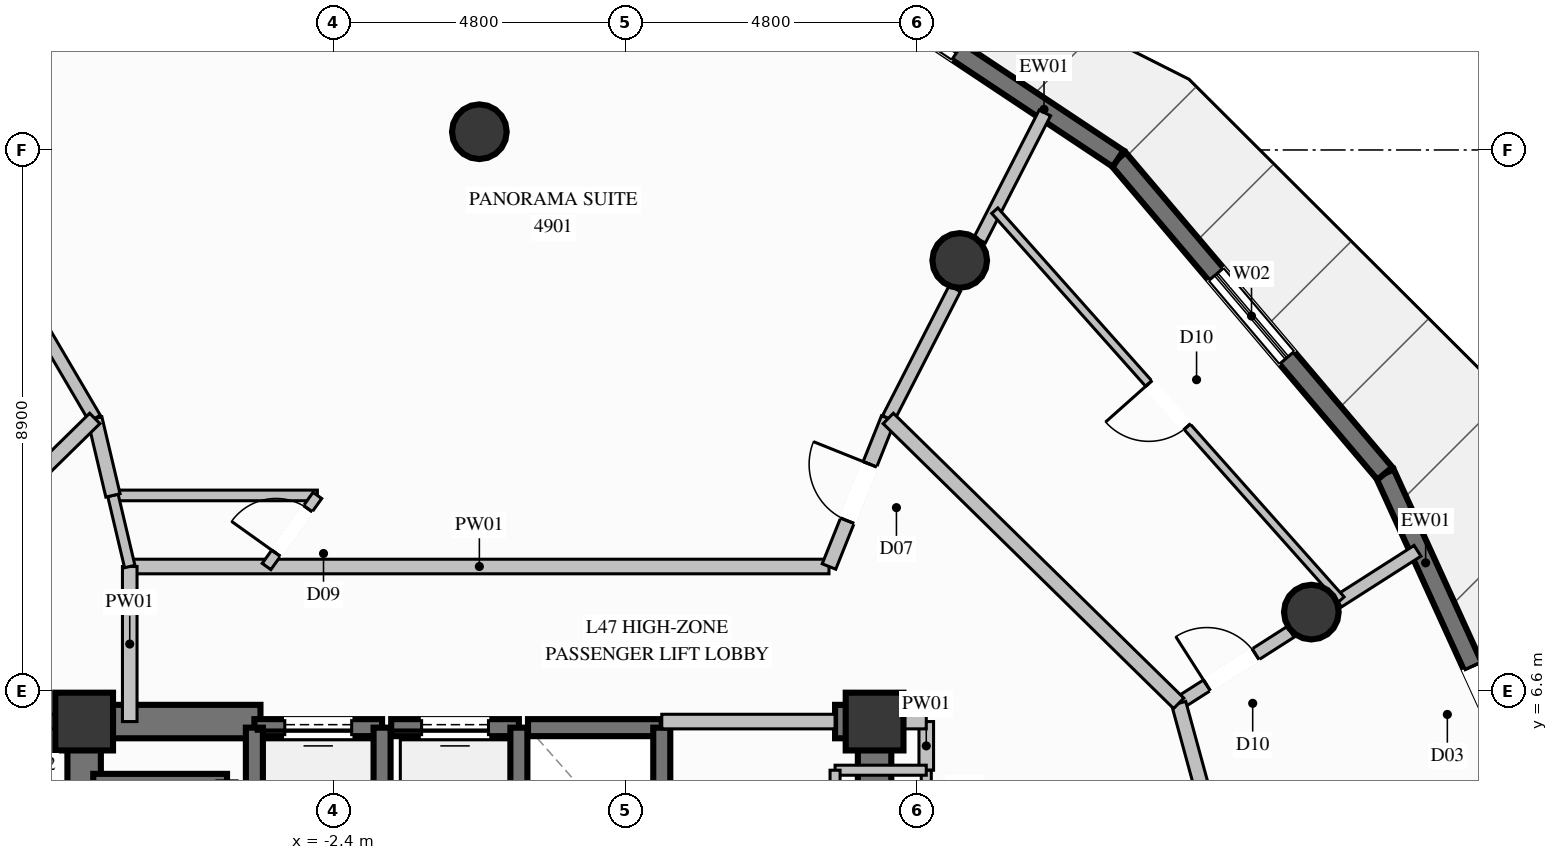
"""IFC4 building model, lengths in metres.
Left out: names, types, materials, properties, quantities, classifications, styles, units other than length and angle.
Written with IfcOpenShell. Run it as: python <this file> out.ifc"""

import sys

from ifc_helpers import new_model, si_unit, direction, frame, frame_2d, origin, origin_2d, place, context, subcontext, project, spatial, rectangle, circle, extrude, element, fill, save


model = new_model("IFC4")
c1 = context("Model", 3, precision=1e-05, world=origin(), true_north=direction((0.0, 1.0)))
c2 = subcontext(c1, "Body", "Model", "MODEL_VIEW")
j1 = project(units=[si_unit("LENGTHUNIT", "METRE"), si_unit("PLANEANGLEUNIT", "RADIAN")], contexts=[c1])
p1 = place(None, origin())
s1 = spatial("IfcSite", under=j1, at=p1, CompositionType="ELEMENT")
p2 = place(p1, origin())
s2 = spatial("IfcBuilding", under=s1, at=p2, CompositionType="ELEMENT")
p3 = place(p2, frame((0.0, 0.0, 184.0)))
s3 = spatial("IfcBuildingStorey", under=s2, at=p3, CompositionType="ELEMENT", Elevation=184.0)
for number, where, z_axis, x_axis in (
    (1, (6.5, 6.1, 0.0), (0.0, 0.0, 1.0), (1.0, 0.0, 0.0)),
    (2, (-6.5, 6.1, 0.0), (0.0, 0.0, 1.0), (1.0, 0.0, 0.0)),
):
    element("IfcColumn", number, at=place(p3, frame(where, z_axis=z_axis, x_axis=x_axis)), inside=s3, PredefinedType="COLUMN", context=c2, shape_type="SweptSolid", body=[
        extrude(rectangle(XDim=0.95, YDim=0.95, at=origin_2d()), origin(), (0.0, 0.0, 1.0), 3.6),
    ])
p4 = place(p3, frame((-6.225, 6.1, 0.0), z_axis=(0.0, 0.0, 1.0), x_axis=(1.0, 0.0, 0.0)))
e3 = element("IfcWall", 3, at=p4, inside=s3, PredefinedType="SHEAR", context=c2, shape_type="SweptSolid", body=[
    extrude(rectangle(XDim=2.625, YDim=0.55, at=frame_2d((1.312, 0.0))), origin(), (0.0, 0.0, 1.0), 3.6),
])
p5 = place(p3, frame((5.85, 6.1, 0.0), z_axis=(0.0, 0.0, 1.0), x_axis=(1.0, 0.0, 0.0)))
e4 = element("IfcWall", 4, at=p5, inside=s3, PredefinedType="SHEAR", context=c2, shape_type="SweptSolid", body=[
    extrude(rectangle(XDim=0.375, YDim=0.55, at=frame_2d((0.188, 0.0))), origin(), (0.0, 0.0, 1.0), 3.6),
])
p6 = place(p3, frame((-6.5, 2.35, 0.0), z_axis=(0.0, 0.0, 1.0), x_axis=(0.0, 1.0, 0.0)))
e5 = element("IfcWall", 5, at=p6, inside=s3, PredefinedType="SHEAR", context=c2, shape_type="SweptSolid", body=[
    extrude(rectangle(XDim=4.025, YDim=0.55, at=frame_2d((2.012, 0.0))), origin(), (0.0, 0.0, 1.0), 3.6),
])
p7 = place(p3, frame((6.5, 3.35, 0.0), z_axis=(0.0, 0.0, 1.0), x_axis=(0.0, 1.0, 0.0)))
e6 = element("IfcWall", 6, at=p7, inside=s3, PredefinedType="SHEAR", context=c2, shape_type="SweptSolid", body=[
    extrude(rectangle(XDim=3.025, YDim=0.55, at=frame_2d((1.512, 0.0))), origin(), (0.0, 0.0, 1.0), 3.6),
])
for number, where, z_axis, x_axis in (
    (7, (13.683, 7.9, 0.0), (0.0, 0.0, 1.0), (1.0, 0.0, 0.0)),
    (8, (7.9, 13.683, 0.0), (0.0, 0.0, 1.0), (1.0, 0.0, 0.0)),
    (9, (0.0, 15.8, 0.0), (0.0, 0.0, 1.0), (1.0, 0.0, 0.0)),
):
    element("IfcColumn", number, at=place(p3, frame(where, z_axis=z_axis, x_axis=x_axis)), inside=s3, PredefinedType="COLUMN", context=c2, shape_type="SweptSolid", body=[
        extrude(circle(Radius=0.45, at=origin_2d()), origin(), (0.0, 0.0, 1.0), 3.6),
    ])
p8 = place(p3, frame((14.892, 10.181, 0.0), z_axis=(0.0, 0.0, 1.0), x_axis=(0.415033398102, -0.909806176314, 0.0)))
e10 = element("IfcWall", 10, at=p8, inside=s3, PredefinedType="SOLIDWALL", context=c2, shape_type="SweptSolid", body=[
    extrude(rectangle(XDim=6.785, YDim=0.32, at=frame_2d((3.393, 0.0))), origin(), (0.0, 0.0, 1.0), 3.36),
])
p9 = place(p8, frame((3.483, 0.0, 0.0)))
e11 = element("IfcOpeningElement", 11, at=p9, cuts=e10, PredefinedType="OPENING", context=c2, shape_type="SweptSolid", body=[
    extrude(rectangle(XDim=1.1, YDim=2.2, at=frame_2d((0.55, 1.1))), frame((0.0, 0.17, 0.0), z_axis=(0.0, -1.0, 0.0), x_axis=(1.0, 0.0, 0.0)), (0.0, 0.0, 1.0), 0.34),
])
p10 = place(p3, frame((10.506, 15.357, 0.0), z_axis=(0.0, 0.0, 1.0), x_axis=(0.646480871515, -0.762930195212, 0.0)))
e12 = element("IfcWall", 12, at=p10, inside=s3, PredefinedType="SOLIDWALL", context=c2, shape_type="SweptSolid", body=[
    extrude(rectangle(XDim=6.784, YDim=0.32, at=frame_2d((3.392, 0.0))), origin(), (0.0, 0.0, 1.0), 3.36),
])
p11 = place(p10, frame((2.492, 0.0, 0.35)))
e13 = element("IfcOpeningElement", 13, at=p11, cuts=e12, PredefinedType="OPENING", context=c2, shape_type="SweptSolid", body=[
    extrude(rectangle(XDim=1.8, YDim=2.6, at=frame_2d((0.9, 1.3))), frame((0.0, 0.17, 0.0), z_axis=(0.0, -1.0, 0.0), x_axis=(1.0, 0.0, 0.0)), (0.0, 0.0, 1.0), 0.34),
])
p12 = place(p3, frame((4.978, 19.031, 0.0), z_axis=(0.0, 0.0, 1.0), x_axis=(0.832836009007, -0.553519811842, 0.0)))
e14 = element("IfcWall", 14, at=p12, inside=s3, PredefinedType="SOLIDWALL", context=c2, shape_type="SweptSolid", body=[
    extrude(rectangle(XDim=6.638, YDim=0.32, at=frame_2d((3.319, 0.0))), origin(), (0.0, 0.0, 1.0), 3.36),
])
p13 = place(p12, frame((1.659, 0.0, 0.35)))
e15 = element("IfcOpeningElement", 15, at=p13, cuts=e14, PredefinedType="OPENING", context=c2, shape_type="SweptSolid", body=[
    extrude(rectangle(XDim=1.8, YDim=2.6, at=frame_2d((0.9, 1.3))), frame((0.0, 0.17, 0.0), z_axis=(0.0, -1.0, 0.0), x_axis=(1.0, 0.0, 0.0)), (0.0, 0.0, 1.0), 0.34),
])
p14 = place(p3, frame((-1.6, 6.0, 0.0), z_axis=(0.0, 0.0, 1.0), x_axis=(-1.0, 0.0, 0.0)))
e16 = element("IfcWall", 16, at=p14, inside=s3, PredefinedType="SOLIDWALL", context=c2, shape_type="SweptSolid", body=[
    extrude(rectangle(XDim=2.1, YDim=0.28, at=frame_2d((1.05, 0.0))), origin(), (0.0, 0.0, 1.0), 3.36),
])
p15 = place(p14, frame((0.5, 0.0, 0.0)))
e17 = element("IfcOpeningElement", 17, at=p15, cuts=e16, PredefinedType="OPENING", context=c2, shape_type="SweptSolid", body=[
    extrude(rectangle(XDim=1.1, YDim=2.2, at=frame_2d((0.55, 1.1))), frame((0.0, 0.15, 0.0), z_axis=(0.0, -1.0, 0.0), x_axis=(1.0, 0.0, 0.0)), (0.0, 0.0, 1.0), 0.3),
])
for number, where, z_axis, x_axis in (
    (18, (-3.7, 6.0, 0.0), (0.0, 0.0, 1.0), (0.0, -1.0, 0.0)),
    (19, (-1.6, 3.5, 0.0), (0.0, 0.0, 1.0), (0.0, 1.0, 0.0)),
):
    element("IfcWall", number, at=place(p3, frame(where, z_axis=z_axis, x_axis=x_axis)), inside=s3, PredefinedType="SOLIDWALL", context=c2, shape_type="SweptSolid", body=[
        extrude(rectangle(XDim=2.5, YDim=0.28, at=frame_2d((1.25, 0.0))), origin(), (0.0, 0.0, 1.0), 3.36),
    ])
p16 = place(p3, frame((0.65, 6.0, 0.0), z_axis=(0.0, 0.0, 1.0), x_axis=(-1.0, 0.0, 0.0)))
e20 = element("IfcWall", 20, at=p16, inside=s3, PredefinedType="SOLIDWALL", context=c2, shape_type="SweptSolid", body=[
    extrude(rectangle(XDim=2.1, YDim=0.28, at=frame_2d((1.05, 0.0))), origin(), (0.0, 0.0, 1.0), 3.36),
])
p17 = place(p16, frame((0.5, 0.0, 0.0)))
e21 = element("IfcOpeningElement", 21, at=p17, cuts=e20, PredefinedType="OPENING", context=c2, shape_type="SweptSolid", body=[
    extrude(rectangle(XDim=1.1, YDim=2.2, at=frame_2d((0.55, 1.1))), frame((0.0, 0.15, 0.0), z_axis=(0.0, -1.0, 0.0), x_axis=(1.0, 0.0, 0.0)), (0.0, 0.0, 1.0), 0.3),
])
p18 = place(p3, frame((0.65, 3.5, 0.0), z_axis=(0.0, 0.0, 1.0), x_axis=(0.0, 1.0, 0.0)))
e22 = element("IfcWall", 22, at=p18, inside=s3, PredefinedType="SOLIDWALL", context=c2, shape_type="SweptSolid", body=[
    extrude(rectangle(XDim=2.5, YDim=0.28, at=frame_2d((1.25, 0.0))), origin(), (0.0, 0.0, 1.0), 3.36),
])
p19 = place(p3, frame((3.0, 6.0, 0.0), z_axis=(0.0, 0.0, 1.0), x_axis=(-1.0, 0.0, 0.0)))
e23 = element("IfcWall", 23, at=p19, inside=s3, PredefinedType="SOLIDWALL", context=c2, shape_type="SweptSolid", body=[
    extrude(rectangle(XDim=2.2, YDim=0.28, at=frame_2d((1.1, 0.0))), origin(), (0.0, 0.0, 1.0), 3.36),
])
p20 = place(p3, frame((3.0, 3.5, 0.0), z_axis=(0.0, 0.0, 1.0), x_axis=(0.0, 1.0, 0.0)))
e24 = element("IfcWall", 24, at=p20, inside=s3, PredefinedType="SOLIDWALL", context=c2, shape_type="SweptSolid", body=[
    extrude(rectangle(XDim=2.5, YDim=0.28, at=frame_2d((1.25, 0.0))), origin(), (0.0, 0.0, 1.0), 3.36),
])
p21 = place(p3, frame((-4.15, 5.1, 0.0), z_axis=(0.0, 0.0, 1.0), x_axis=(-1.0, 0.0, 0.0)))
e25 = element("IfcWall", 25, at=p21, inside=s3, PredefinedType="SOLIDWALL", context=c2, shape_type="SweptSolid", body=[
    extrude(rectangle(XDim=2.2, YDim=0.28, at=frame_2d((1.1, 0.0))), origin(), (0.0, 0.0, 1.0), 3.36),
])
p22 = place(p3, frame((-5.75, 8.65, 0.0), z_axis=(0.0, 0.0, 1.0), x_axis=(1.0, 0.0, 0.0)))
e26 = element("IfcWall", 26, at=p22, inside=s3, PredefinedType="PARTITIONING", context=c2, shape_type="SweptSolid", body=[
    extrude(rectangle(XDim=11.5, YDim=0.24, at=frame_2d((5.75, 0.0))), origin(), (0.0, 0.0, 1.0), 3.36),
])
p23 = place(p3, frame((3.0, 6.1, 0.0), z_axis=(0.0, 0.0, 1.0), x_axis=(1.0, 0.0, 0.0)))
e27 = element("IfcWall", 27, at=p23, inside=s3, PredefinedType="PARTITIONING", context=c2, shape_type="SweptSolid", body=[
    extrude(rectangle(XDim=2.85, YDim=0.24, at=frame_2d((1.425, 0.0))), origin(), (0.0, 0.0, 1.0), 2.445),
])
p24 = place(p3, frame((7.35, 5.3, 0.0), z_axis=(0.0, 0.0, 1.0), x_axis=(0.0, 1.0, 0.0)))
e28 = element("IfcWall", 28, at=p24, inside=s3, PredefinedType="PARTITIONING", context=c2, shape_type="SweptSolid", body=[
    extrude(rectangle(XDim=0.8, YDim=0.24, at=frame_2d((0.4, 0.0))), origin(), (0.0, 0.0, 1.0), 2.445),
])
p25 = place(p3, frame((6.5, 6.1, 0.0), z_axis=(0.0, 0.0, 1.0), x_axis=(1.0, 0.0, 0.0)))
e29 = element("IfcWall", 29, at=p25, inside=s3, PredefinedType="PARTITIONING", context=c2, shape_type="SweptSolid", body=[
    extrude(rectangle(XDim=0.85, YDim=0.24, at=frame_2d((0.425, 0.0))), origin(), (0.0, 0.0, 1.0), 2.877),
])
p26 = place(p3, frame((-5.75, 6.1, 0.0), z_axis=(0.0, 0.0, 1.0), x_axis=(0.0, 1.0, 0.0)))
e30 = element("IfcWall", 30, at=p26, inside=s3, PredefinedType="PARTITIONING", context=c2, shape_type="SweptSolid", body=[
    extrude(rectangle(XDim=2.55, YDim=0.24, at=frame_2d((1.275, 0.0))), origin(), (0.0, 0.0, 1.0), 3.36),
])
p27 = place(p3, frame((-7.35, 6.1, 0.0), z_axis=(0.0, 0.0, 1.0), x_axis=(1.0, 0.0, 0.0)))
e31 = element("IfcWall", 31, at=p27, inside=s3, PredefinedType="PARTITIONING", context=c2, shape_type="SweptSolid", body=[
    extrude(rectangle(XDim=0.85, YDim=0.24, at=frame_2d((0.425, 0.0))), origin(), (0.0, 0.0, 1.0), 2.877),
])
p28 = place(p3, frame((7.35, 3.35, 0.0), z_axis=(0.0, 0.0, 1.0), x_axis=(0.0, 1.0, 0.0)))
e32 = element("IfcWall", 32, at=p28, inside=s3, PredefinedType="PARTITIONING", context=c2, shape_type="SweptSolid", body=[
    extrude(rectangle(XDim=1.95, YDim=0.165, at=frame_2d((0.975, 0.0))), origin(), (0.0, 0.0, 1.0), 3.36),
])
p29 = place(p28, frame((0.5, 0.0, 0.0)))
e33 = element("IfcOpeningElement", 33, at=p29, cuts=e32, PredefinedType="OPENING", context=c2, shape_type="SweptSolid", body=[
    extrude(rectangle(XDim=0.95, YDim=2.1, at=frame_2d((0.475, 1.05))), frame((0.0, 0.093, 0.0), z_axis=(0.0, -1.0, 0.0), x_axis=(1.0, 0.0, 0.0)), (0.0, 0.0, 1.0), 0.185),
])
p30 = place(p3, frame((7.35, 5.3, 0.0), z_axis=(0.0, 0.0, 1.0), x_axis=(-1.0, 0.0, 0.0)))
e34 = element("IfcWall", 34, at=p30, inside=s3, PredefinedType="PARTITIONING", context=c2, shape_type="SweptSolid", body=[
    extrude(rectangle(XDim=1.5, YDim=0.165, at=frame_2d((0.75, 0.0))), origin(), (0.0, 0.0, 1.0), 2.445),
])
p31 = place(p3, frame((5.85, 5.3, 0.0), z_axis=(0.0, 0.0, 1.0), x_axis=(0.0, -1.0, 0.0)))
e35 = element("IfcWall", 35, at=p31, inside=s3, PredefinedType="PARTITIONING", context=c2, shape_type="SweptSolid", body=[
    extrude(rectangle(XDim=1.95, YDim=0.165, at=frame_2d((0.975, 0.0))), origin(), (0.0, 0.0, 1.0), 2.445),
])
p32 = place(p3, frame((11.502, 6.4, 0.0), z_axis=(0.0, 0.0, 1.0), x_axis=(0.842739917801, 0.538320936752, 0.0)))
e36 = element("IfcWall", 36, at=p32, inside=s3, PredefinedType="PARTITIONING", context=c2, shape_type="SweptSolid", body=[
    extrude(rectangle(XDim=2.185, YDim=0.21, at=frame_2d((1.092, 0.0))), origin(), (0.0, 0.0, 1.0), 2.877),
])
p33 = place(p32, frame((0.55, 0.0, 0.0)))
e37 = element("IfcOpeningElement", 37, at=p33, cuts=e36, PredefinedType="OPENING", context=c2, shape_type="SweptSolid", body=[
    extrude(rectangle(XDim=0.95, YDim=2.1, at=frame_2d((0.475, 1.05))), frame((0.0, 0.115, 0.0), z_axis=(0.0, -1.0, 0.0), x_axis=(1.0, 0.0, 0.0)), (0.0, 0.0, 1.0), 0.23),
])
p34 = place(p3, frame((14.12, 8.072, 0.0), z_axis=(0.0, 0.0, 1.0), x_axis=(0.84277351824, 0.538268331739, 0.0)))
e38 = element("IfcWall", 38, at=p34, inside=s3, PredefinedType="PARTITIONING", context=c2, shape_type="SweptSolid", body=[
    extrude(rectangle(XDim=1.553, YDim=0.21, at=frame_2d((0.776, 0.0))), origin(), (0.0, 0.0, 1.0), 3.36),
])
p35 = place(p3, frame((6.725, 11.085, 0.0), z_axis=(0.0, 0.0, 1.0), x_axis=(0.456025303107, 0.889966810014, 0.0)))
e39 = element("IfcWall", 39, at=p35, inside=s3, PredefinedType="PARTITIONING", context=c2, shape_type="SweptSolid", body=[
    extrude(rectangle(XDim=2.399, YDim=0.21, at=frame_2d((1.199, 0.0))), origin(), (0.0, 0.0, 1.0), 2.877),
])
p36 = place(p3, frame((8.229, 14.019, 0.0), z_axis=(0.0, 0.0, 1.0), x_axis=(0.456209070118, 0.889872622538, 0.0)))
e40 = element("IfcWall", 40, at=p36, inside=s3, PredefinedType="PARTITIONING", context=c2, shape_type="SweptSolid", body=[
    extrude(rectangle(XDim=2.35, YDim=0.21, at=frame_2d((1.175, 0.0))), origin(), (0.0, 0.0, 1.0), 3.36),
])
p37 = place(p3, frame((-6.325, 11.085, 0.0), z_axis=(0.0, 0.0, 1.0), x_axis=(-0.506285052897, 0.862366189744, 0.0)))
e41 = element("IfcWall", 41, at=p37, inside=s3, PredefinedType="PARTITIONING", context=c2, shape_type="SweptSolid", body=[
    extrude(rectangle(XDim=2.57, YDim=0.21, at=frame_2d((1.285, 0.0))), origin(), (0.0, 0.0, 1.0), 2.877),
])
p38 = place(p3, frame((-6.026, 9.819, 0.0), z_axis=(0.0, 0.0, 1.0), x_axis=(1.0, 0.0, 0.0)))
e42 = element("IfcWall", 42, at=p38, inside=s3, PredefinedType="PLUMBINGWALL", context=c2, shape_type="SweptSolid", body=[
    extrude(rectangle(XDim=3.362, YDim=0.175, at=frame_2d((1.681, 0.0))), origin(), (0.0, 0.0, 1.0), 3.043),
])
p39 = place(p3, frame((-6.026, 9.819, 0.0), z_axis=(0.0, 0.0, 1.0), x_axis=(0.229650980365, -0.973273048644, 0.0)))
e43 = element("IfcWall", 43, at=p39, inside=s3, PredefinedType="PLUMBINGWALL", context=c2, shape_type="SweptSolid", body=[
    extrude(rectangle(XDim=1.201, YDim=0.175, at=frame_2d((0.601, 0.0))), origin(), (0.0, 0.0, 1.0), 3.36),
])
p40 = place(p3, frame((-3.5, 8.65, 0.0), z_axis=(0.0, 0.0, 1.0), x_axis=(0.581607698531, 0.813469412461, 0.0)))
e44 = element("IfcWall", 44, at=p40, inside=s3, PredefinedType="PLUMBINGWALL", context=c2, shape_type="SweptSolid", body=[
    extrude(rectangle(XDim=1.437, YDim=0.175, at=frame_2d((0.719, 0.0))), origin(), (0.0, 0.0, 1.0), 3.36),
])
p41 = place(p40, frame((0.269, 0.0, 0.0)))
e45 = element("IfcOpeningElement", 45, at=p41, cuts=e44, PredefinedType="OPENING", context=c2, shape_type="SweptSolid", body=[
    extrude(rectangle(XDim=0.9, YDim=2.1, at=frame_2d((0.45, 1.05))), frame((0.0, 0.098, 0.0), z_axis=(0.0, -1.0, 0.0), x_axis=(1.0, 0.0, 0.0)), (0.0, 0.0, 1.0), 0.195),
])
p42 = place(p3, frame((-6.026, 9.819, 0.0), z_axis=(0.0, 0.0, 1.0), x_axis=(-0.229928489857, 0.973207526457, 0.0)))
e46 = element("IfcWall", 46, at=p42, inside=s3, PredefinedType="PARTITIONING", context=c2, shape_type="SweptSolid", body=[
    extrude(rectangle(XDim=1.301, YDim=0.24, at=frame_2d((0.65, 0.0))), origin(), (0.0, 0.0, 1.0), 3.36),
])
p43 = place(p3, frame((5.75, 8.65, 0.0), z_axis=(0.0, 0.0, 1.0), x_axis=(0.371743694646, 0.928335405708, 0.0)))
e47 = element("IfcWall", 47, at=p43, inside=s3, PredefinedType="PARTITIONING", context=c2, shape_type="SweptSolid", body=[
    extrude(rectangle(XDim=2.623, YDim=0.24, at=frame_2d((1.312, 0.0))), origin(), (0.0, 0.0, 1.0), 3.36),
])
p44 = place(p43, frame((0.811, 0.0, 0.0)))
e48 = element("IfcOpeningElement", 48, at=p44, cuts=e47, PredefinedType="OPENING", context=c2, shape_type="SweptSolid", body=[
    extrude(rectangle(XDim=1.0, YDim=2.2, at=frame_2d((0.5, 1.1))), frame((0.0, 0.13, 0.0), z_axis=(0.0, -1.0, 0.0), x_axis=(1.0, 0.0, 0.0)), (0.0, 0.0, 1.0), 0.26),
])
p45 = place(p3, frame((-6.325, 11.085, 0.0), z_axis=(0.0, 0.0, 1.0), x_axis=(-0.713850549357, -0.700298074524, 0.0)))
e49 = element("IfcWall", 49, at=p45, inside=s3, PredefinedType="PARTITIONING", context=c2, shape_type="SweptSolid", body=[
    extrude(rectangle(XDim=2.81, YDim=0.24, at=frame_2d((1.405, 0.0))), origin(), (0.0, 0.0, 1.0), 3.36),
])
p46 = place(p3, frame((13.25, 0.0, 0.0), z_axis=(0.0, 0.0, 1.0), x_axis=(-0.263484816116, 0.96466354325, 0.0)))
e50 = element("IfcWall", 50, at=p46, inside=s3, PredefinedType="PARTITIONING", context=c2, shape_type="SweptSolid", body=[
    extrude(rectangle(XDim=6.634, YDim=0.24, at=frame_2d((3.317, 0.0))), origin(), (0.0, 0.0, 1.0), 3.36),
])
p47 = place(p3, frame((11.502, 6.4, 0.0), z_axis=(0.0, 0.0, 1.0), x_axis=(-0.713933337596, 0.700213674152, 0.0)))
e51 = element("IfcWall", 51, at=p47, inside=s3, PredefinedType="PARTITIONING", context=c2, shape_type="SweptSolid", body=[
    extrude(rectangle(XDim=6.691, YDim=0.24, at=frame_2d((3.345, 0.0))), origin(), (0.0, 0.0, 1.0), 3.36),
])
p48 = place(p3, frame((14.172, 8.105, 0.0), z_axis=(0.0, 0.0, 1.0), x_axis=(-0.664942198266, 0.74689482055, 0.0)))
e52 = element("IfcWall", 52, at=p48, inside=s3, PredefinedType="PARTITIONING", context=c2, shape_type="SweptSolid", body=[
    extrude(rectangle(XDim=8.565, YDim=0.135, at=frame_2d((4.282, 0.0))), origin(), (0.0, 0.0, 1.0), 2.929),
])
p49 = place(p48, frame((3.807, 0.0, 0.0)))
e53 = element("IfcOpeningElement", 53, at=p49, cuts=e52, PredefinedType="OPENING", context=c2, shape_type="SweptSolid", body=[
    extrude(rectangle(XDim=0.95, YDim=2.1, at=frame_2d((0.475, 1.05))), frame((0.0, 0.078, 0.0), z_axis=(0.0, -1.0, 0.0), x_axis=(1.0, 0.0, 0.0)), (0.0, 0.0, 1.0), 0.155),
])
p50 = place(p9, origin())
e54 = element("IfcDoor", 54, at=p50, inside=s3, OperationType="SINGLE_SWING_LEFT", PredefinedType="DOOR", context=c2, shape_type="SweptSolid", body=[
    extrude(rectangle(XDim=1.1, YDim=2.2, at=frame_2d((0.55, 1.1))), frame((0.0, 0.025, 0.0), z_axis=(0.0, -1.0, 0.0), x_axis=(1.0, 0.0, 0.0)), (0.0, 0.0, 1.0), 0.05),
])
fill(e11, e54)
p51 = place(p11, origin())
e55 = element("IfcWindow", 55, at=p51, inside=s3, PartitioningType="SINGLE_PANEL", PredefinedType="WINDOW", context=c2, shape_type="SweptSolid", body=[
    extrude(rectangle(XDim=1.8, YDim=2.6, at=frame_2d((0.9, 1.3))), frame((0.0, 0.03, 0.0), z_axis=(0.0, -1.0, 0.0), x_axis=(1.0, 0.0, 0.0)), (0.0, 0.0, 1.0), 0.06),
])
fill(e13, e55)
p52 = place(p13, origin())
e56 = element("IfcWindow", 56, at=p52, inside=s3, PartitioningType="SINGLE_PANEL", PredefinedType="WINDOW", context=c2, shape_type="SweptSolid", body=[
    extrude(rectangle(XDim=1.8, YDim=2.6, at=frame_2d((0.9, 1.3))), frame((0.0, 0.03, 0.0), z_axis=(0.0, -1.0, 0.0), x_axis=(1.0, 0.0, 0.0)), (0.0, 0.0, 1.0), 0.06),
])
fill(e15, e56)
p53 = place(p15, origin())
e57 = element("IfcDoor", 57, at=p53, inside=s3, OperationType="SLIDING_TO_LEFT", PredefinedType="DOOR", context=c2, shape_type="SweptSolid", body=[
    extrude(rectangle(XDim=1.1, YDim=2.2, at=frame_2d((0.55, 1.1))), frame((0.0, 0.025, 0.0), z_axis=(0.0, -1.0, 0.0), x_axis=(1.0, 0.0, 0.0)), (0.0, 0.0, 1.0), 0.05),
])
fill(e17, e57)
p54 = place(p17, origin())
e58 = element("IfcDoor", 58, at=p54, inside=s3, OperationType="SLIDING_TO_LEFT", PredefinedType="DOOR", context=c2, shape_type="SweptSolid", body=[
    extrude(rectangle(XDim=1.1, YDim=2.2, at=frame_2d((0.55, 1.1))), frame((0.0, 0.025, 0.0), z_axis=(0.0, -1.0, 0.0), x_axis=(1.0, 0.0, 0.0)), (0.0, 0.0, 1.0), 0.05),
])
fill(e21, e58)
p55 = place(p41, origin())
e59 = element("IfcDoor", 59, at=p55, inside=s3, OperationType="SINGLE_SWING_LEFT", PredefinedType="DOOR", context=c2, shape_type="SweptSolid", body=[
    extrude(rectangle(XDim=0.9, YDim=2.1, at=frame_2d((0.45, 1.05))), frame((0.0, 0.025, 0.0), z_axis=(0.0, -1.0, 0.0), x_axis=(1.0, 0.0, 0.0)), (0.0, 0.0, 1.0), 0.05),
])
fill(e45, e59)
p56 = place(p44, origin())
e60 = element("IfcDoor", 60, at=p56, inside=s3, OperationType="SINGLE_SWING_RIGHT", PredefinedType="DOOR", context=c2, shape_type="SweptSolid", body=[
    extrude(rectangle(XDim=1.0, YDim=2.2, at=frame_2d((0.5, 1.1))), frame((0.0, 0.025, 0.0), z_axis=(0.0, -1.0, 0.0), x_axis=(1.0, 0.0, 0.0)), (0.0, 0.0, 1.0), 0.05),
])
fill(e48, e60)
p57 = place(p33, origin())
e61 = element("IfcDoor", 61, at=p57, inside=s3, OperationType="SINGLE_SWING_LEFT", PredefinedType="DOOR", context=c2, shape_type="SweptSolid", body=[
    extrude(rectangle(XDim=0.95, YDim=2.1, at=frame_2d((0.475, 1.05))), frame((0.0, 0.025, 0.0), z_axis=(0.0, -1.0, 0.0), x_axis=(1.0, 0.0, 0.0)), (0.0, 0.0, 1.0), 0.05),
])
fill(e37, e61)
p58 = place(p49, origin())
e62 = element("IfcDoor", 62, at=p58, inside=s3, OperationType="SINGLE_SWING_RIGHT", PredefinedType="DOOR", context=c2, shape_type="SweptSolid", body=[
    extrude(rectangle(XDim=0.95, YDim=2.1, at=frame_2d((0.475, 1.05))), frame((0.0, 0.025, 0.0), z_axis=(0.0, -1.0, 0.0), x_axis=(1.0, 0.0, 0.0)), (0.0, 0.0, 1.0), 0.05),
])
fill(e53, e62)
save(model, sys.argv[1])
